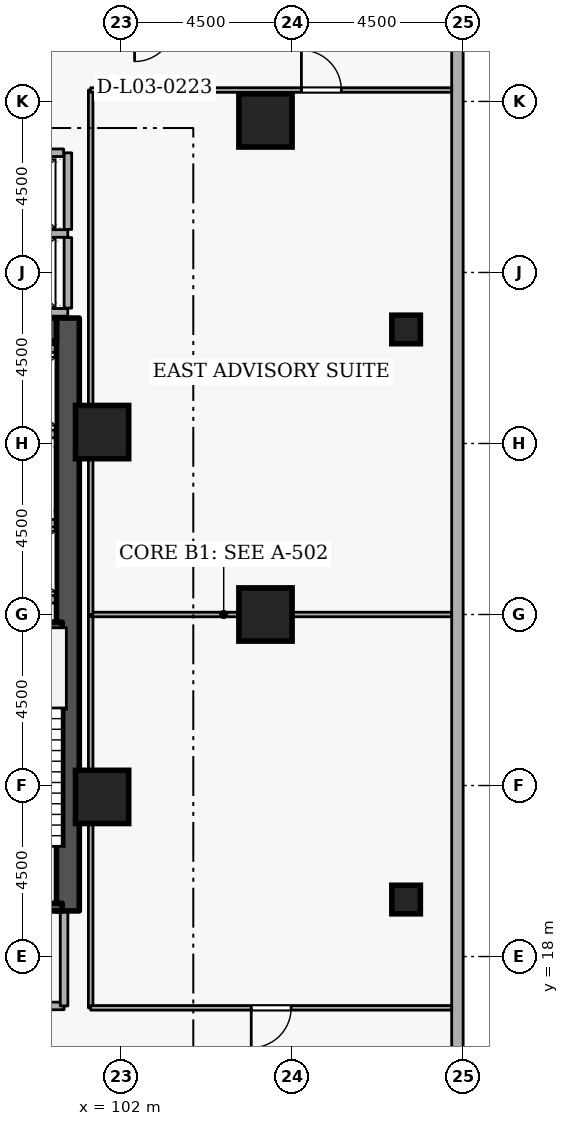
"""IFC4 building model, lengths in metres.
Left out: names, types, materials, properties, quantities, classifications, styles, units other than length and angle.
Written with IfcOpenShell. Run it as: python <this file> out.ifc"""

import sys

from ifc_helpers import new_model, si_unit, direction, frame, frame_2d, origin, origin_2d, place, context, subcontext, project, spatial, rectangle, extrude, element, fill, save


model = new_model("IFC4")
c1 = context("Model", 3, precision=1e-05, world=origin(), true_north=direction((0.0, 1.0)))
c2 = subcontext(c1, "Body", "Model", "MODEL_VIEW")
j1 = project(units=[si_unit("LENGTHUNIT", "METRE"), si_unit("PLANEANGLEUNIT", "RADIAN")], contexts=[c1])
p1 = place(None, origin())
s1 = spatial("IfcSite", under=j1, at=p1, CompositionType="ELEMENT")
p2 = place(p1, origin())
s2 = spatial("IfcBuilding", under=s1, at=p2, CompositionType="ELEMENT")
p3 = place(p2, frame((0.0, 0.0, 14.1)))
s3 = spatial("IfcBuildingStorey", under=s2, at=p3, CompositionType="ELEMENT", Elevation=14.1)
p4 = place(p3, frame((100.6, 19.2, 0.0), z_axis=(0.0, 0.0, 1.0), x_axis=(0.0, 1.0, 0.0)))
e1 = element("IfcWall", 1, at=p4, inside=s3, PredefinedType="SHEAR", context=c2, shape_type="SweptSolid", body=[
    extrude(rectangle(XDim=15.6, YDim=0.6, at=frame_2d((7.8, 0.0))), origin(), (0.0, 0.0, 1.0), 4.5),
])
p5 = place(p3, frame((94.6, 34.5, 0.0), z_axis=(0.0, 0.0, 1.0), x_axis=(1.0, 0.0, 0.0)))
e2 = element("IfcWall", 2, at=p5, inside=s3, PredefinedType="SHEAR", context=c2, shape_type="SweptSolid", body=[
    extrude(rectangle(XDim=5.7, YDim=0.6, at=frame_2d((2.85, 0.0))), origin(), (0.0, 0.0, 1.0), 4.5),
])
for number, where, z_axis, x_axis in (
    (3, (105.8, 27.0, 0.0), (0.0, 0.0, 1.0), (1.0, 0.0, 0.0)),
    (4, (105.8, 40.0, 0.0), (0.0, 0.0, 1.0), (1.0, 0.0, 0.0)),
    (5, (101.5, 22.2, 0.0), (0.0, 0.0, 1.0), (1.0, 0.0, 0.0)),
    (6, (101.5, 31.8, 0.0), (0.0, 0.0, 1.0), (1.0, 0.0, 0.0)),
):
    element("IfcColumn", number, at=place(p3, frame(where, z_axis=z_axis, x_axis=x_axis)), inside=s3, PredefinedType="COLUMN", context=c2, shape_type="SweptSolid", body=[
        extrude(rectangle(XDim=1.4, YDim=1.4, at=origin_2d()), origin(), (0.0, 0.0, 1.0), 4.5),
    ])
for number, where, z_axis, x_axis in (
    (7, (109.5, 19.5, 0.0), (0.0, 0.0, 1.0), (1.0, 0.0, 0.0)),
    (8, (109.5, 34.5, 0.0), (0.0, 0.0, 1.0), (1.0, 0.0, 0.0)),
):
    element("IfcColumn", number, at=place(p3, frame(where, z_axis=z_axis, x_axis=x_axis)), inside=s3, PredefinedType="COLUMN", context=c2, shape_type="SweptSolid", body=[
        extrude(rectangle(XDim=0.75, YDim=0.75, at=origin_2d()), origin(), (0.0, 0.0, 1.0), 4.5),
    ])
p6 = place(p3, frame((110.85, 9.32, 0.0), z_axis=(0.0, 0.0, 1.0), x_axis=(0.0, 1.0, 0.0)))
e9 = element("IfcWall", 9, at=p6, inside=s3, PredefinedType="STANDARD", context=c2, shape_type="SweptSolid", body=[
    extrude(rectangle(XDim=39.86, YDim=0.3, at=frame_2d((19.93, 0.0))), origin(), (0.0, 0.0, 1.0), 3.56),
])
for number, where, z_axis, x_axis in (
    (10, (97.852, 29.4, 0.0), (0.0, 0.0, 1.0), (1.0, 0.0, 0.0)),
    (11, (97.852, 27.4, 0.0), (0.0, 0.0, 1.0), (1.0, 0.0, 0.0)),
    (12, (97.852, 31.75, 0.0), (0.0, 0.0, 1.0), (1.0, 0.0, 0.0)),
    (13, (97.852, 34.0, 0.0), (0.0, 0.0, 1.0), (1.0, 0.0, 0.0)),
):
    element("IfcWall", number, at=place(p3, frame(where, z_axis=z_axis, x_axis=x_axis)), inside=s3, PredefinedType="STANDARD", context=c2, shape_type="SweptSolid", body=[
        extrude(rectangle(XDim=2.436, YDim=0.2, at=frame_2d((1.218, 0.0))), origin(), (0.0, 0.0, 1.0), 4.16),
    ])
for number, where, z_axis, x_axis in (
    (14, (97.852, 37.025, 0.0), (0.0, 0.0, 1.0), (1.0, 0.0, 0.0)),
    (15, (97.852, 34.95, 0.0), (0.0, 0.0, 1.0), (1.0, 0.0, 0.0)),
):
    element("IfcWall", number, at=place(p3, frame(where, z_axis=z_axis, x_axis=x_axis)), inside=s3, PredefinedType="STANDARD", context=c2, shape_type="SweptSolid", body=[
        extrude(rectangle(XDim=2.746, YDim=0.2, at=frame_2d((1.373, 0.0))), origin(), (0.0, 0.0, 1.0), 4.16),
    ])
p7 = place(p3, frame((100.6, 35.062, 0.0), z_axis=(0.0, 0.0, 1.0), x_axis=(0.0, 1.0, 0.0)))
e16 = element("IfcWall", 16, at=p7, inside=s3, PredefinedType="STANDARD", context=c2, shape_type="SweptSolid", body=[
    extrude(rectangle(XDim=1.856, YDim=0.2, at=frame_2d((0.928, 0.0))), origin(), (0.0, 0.0, 1.0), 4.16),
])
p8 = place(p3, frame((100.6, 37.132, 0.0), z_axis=(0.0, 0.0, 1.0), x_axis=(0.0, 1.0, 0.0)))
e17 = element("IfcWall", 17, at=p8, inside=s3, PredefinedType="STANDARD", context=c2, shape_type="SweptSolid", body=[
    extrude(rectangle(XDim=2.016, YDim=0.2, at=frame_2d((1.008, 0.0))), origin(), (0.0, 0.0, 1.0), 4.16),
])
p9 = place(p3, frame((97.852, 39.15, 0.0), z_axis=(0.0, 0.0, 1.0), x_axis=(1.0, 0.0, 0.0)))
e18 = element("IfcWall", 18, at=p9, inside=s3, PredefinedType="STANDARD", context=c2, shape_type="SweptSolid", body=[
    extrude(rectangle(XDim=2.636, YDim=0.2, at=frame_2d((1.318, 0.0))), origin(), (0.0, 0.0, 1.0), 4.16),
])
p10 = place(p3, frame((100.45, 19.3, 0.0), z_axis=(0.0, 0.0, 1.0), x_axis=(-1.0, 0.0, 0.0)))
e19 = element("IfcWall", 19, at=p10, inside=s3, PredefinedType="SHEAR", context=c2, shape_type="SweptSolid", body=[
    extrude(rectangle(XDim=3.35, YDim=0.2, at=frame_2d((1.675, 0.0))), origin(), (0.0, 0.0, 1.0), 4.5),
])
p11 = place(p10, frame((1.125, 0.0, 0.0)))
e20 = element("IfcOpeningElement", 20, at=p11, cuts=e19, PredefinedType="OPENING", context=c2, shape_type="SweptSolid", body=[
    extrude(rectangle(XDim=1.1, YDim=2.1, at=frame_2d((0.55, 1.05))), frame((0.0, 0.11, 0.0), z_axis=(0.0, -1.0, 0.0), x_axis=(1.0, 0.0, 0.0)), (0.0, 0.0, 1.0), 0.22),
])
p12 = place(p3, frame((97.1, 26.7, 0.0), z_axis=(0.0, 0.0, 1.0), x_axis=(1.0, 0.0, 0.0)))
e21 = element("IfcWall", 21, at=p12, inside=s3, PredefinedType="SHEAR", context=c2, shape_type="SweptSolid", body=[
    extrude(rectangle(XDim=3.35, YDim=0.2, at=frame_2d((1.675, 0.0))), origin(), (0.0, 0.0, 1.0), 4.5),
])
p13 = place(p3, frame((95.35, 16.7, 0.0), z_axis=(0.0, 0.0, 1.0), x_axis=(1.0, 0.0, 0.0)))
e22 = element("IfcWall", 22, at=p13, inside=s3, PredefinedType="STANDARD", context=c2, shape_type="SweptSolid", body=[
    extrude(rectangle(XDim=5.15, YDim=0.2, at=frame_2d((2.575, 0.0))), origin(), (0.0, 0.0, 1.0), 4.16),
])
p14 = place(p13, frame((2.0, 0.0, 0.0)))
e23 = element("IfcOpeningElement", 23, at=p14, cuts=e22, PredefinedType="OPENING", context=c2, shape_type="SweptSolid", body=[
    extrude(rectangle(XDim=1.15, YDim=2.1, at=frame_2d((0.575, 1.05))), frame((0.0, 0.11, 0.0), z_axis=(0.0, -1.0, 0.0), x_axis=(1.0, 0.0, 0.0)), (0.0, 0.0, 1.0), 0.22),
])
p15 = place(p3, frame((100.5, 16.7, 0.0), z_axis=(0.0, 0.0, 1.0), x_axis=(0.0, 1.0, 0.0)))
e24 = element("IfcWall", 24, at=p15, inside=s3, PredefinedType="STANDARD", context=c2, shape_type="SweptSolid", body=[
    extrude(rectangle(XDim=2.5, YDim=0.2, at=frame_2d((1.25, 0.0))), origin(), (0.0, 0.0, 1.0), 4.16),
])
p16 = place(p3, frame((101.2, 16.65, 0.0), z_axis=(0.0, 0.0, 1.0), x_axis=(0.0, 1.0, 0.0)))
e25 = element("IfcWall", 25, at=p16, inside=s3, PredefinedType="PARTITIONING", context=c2, shape_type="SweptSolid", body=[
    extrude(rectangle(XDim=10.35, YDim=0.12, at=frame_2d((5.175, 0.0))), origin(), (0.0, 0.0, 1.0), 4.16),
])
p17 = place(p3, frame((101.2, 27.0, 0.0), z_axis=(0.0, 0.0, 1.0), x_axis=(1.0, 0.0, 0.0)))
e26 = element("IfcWall", 26, at=p17, inside=s3, PredefinedType="PARTITIONING", context=c2, shape_type="SweptSolid", body=[
    extrude(rectangle(XDim=9.5, YDim=0.12, at=frame_2d((4.75, 0.0))), origin(), (0.0, 0.0, 1.0), 4.16),
])
p18 = place(p3, frame((110.7, 16.65, 0.0), z_axis=(0.0, 0.0, 1.0), x_axis=(-1.0, 0.0, 0.0)))
e27 = element("IfcWall", 27, at=p18, inside=s3, PredefinedType="PARTITIONING", context=c2, shape_type="SweptSolid", body=[
    extrude(rectangle(XDim=9.5, YDim=0.12, at=frame_2d((4.75, 0.0))), origin(), (0.0, 0.0, 1.0), 4.16),
])
p19 = place(p18, frame((4.225, 0.0, 0.0)))
e28 = element("IfcOpeningElement", 28, at=p19, cuts=e27, PredefinedType="OPENING", context=c2, shape_type="SweptSolid", body=[
    extrude(rectangle(XDim=1.05, YDim=2.1, at=frame_2d((0.525, 1.05))), frame((0.0, 0.07, 0.0), z_axis=(0.0, -1.0, 0.0), x_axis=(1.0, 0.0, 0.0)), (0.0, 0.0, 1.0), 0.14),
])
p20 = place(p3, frame((101.2, 27.0, 0.0), z_axis=(0.0, 0.0, 1.0), x_axis=(0.0, 1.0, 0.0)))
e29 = element("IfcWall", 29, at=p20, inside=s3, PredefinedType="PARTITIONING", context=c2, shape_type="SweptSolid", body=[
    extrude(rectangle(XDim=13.8, YDim=0.12, at=frame_2d((6.9, 0.0))), origin(), (0.0, 0.0, 1.0), 4.16),
])
p21 = place(p3, frame((101.2, 40.8, 0.0), z_axis=(0.0, 0.0, 1.0), x_axis=(1.0, 0.0, 0.0)))
e30 = element("IfcWall", 30, at=p21, inside=s3, PredefinedType="PARTITIONING", context=c2, shape_type="SweptSolid", body=[
    extrude(rectangle(XDim=9.5, YDim=0.12, at=frame_2d((4.75, 0.0))), origin(), (0.0, 0.0, 1.0), 4.16),
])
p22 = place(p21, frame((5.545, 0.0, 0.0)))
e31 = element("IfcOpeningElement", 31, at=p22, cuts=e30, PredefinedType="OPENING", context=c2, shape_type="SweptSolid", body=[
    extrude(rectangle(XDim=1.05, YDim=2.1, at=frame_2d((0.525, 1.05))), frame((0.0, 0.07, 0.0), z_axis=(0.0, -1.0, 0.0), x_axis=(1.0, 0.0, 0.0)), (0.0, 0.0, 1.0), 0.14),
])
p23 = place(p19, origin())
e32 = element("IfcDoor", 32, at=p23, inside=s3, OperationType="SINGLE_SWING_RIGHT", PredefinedType="DOOR", context=c2, shape_type="SweptSolid", body=[
    extrude(rectangle(XDim=1.05, YDim=2.1, at=frame_2d((0.525, 1.05))), frame((0.0, 0.025, 0.0), z_axis=(0.0, -1.0, 0.0), x_axis=(1.0, 0.0, 0.0)), (0.0, 0.0, 1.0), 0.05),
])
fill(e28, e32)
p24 = place(p22, origin())
e33 = element("IfcDoor", 33, at=p24, inside=s3, OperationType="SINGLE_SWING_LEFT", PredefinedType="DOOR", context=c2, shape_type="SweptSolid", body=[
    extrude(rectangle(XDim=1.05, YDim=2.1, at=frame_2d((0.525, 1.05))), frame((0.0, 0.025, 0.0), z_axis=(0.0, -1.0, 0.0), x_axis=(1.0, 0.0, 0.0)), (0.0, 0.0, 1.0), 0.05),
])
fill(e31, e33)
save(model, sys.argv[1])
